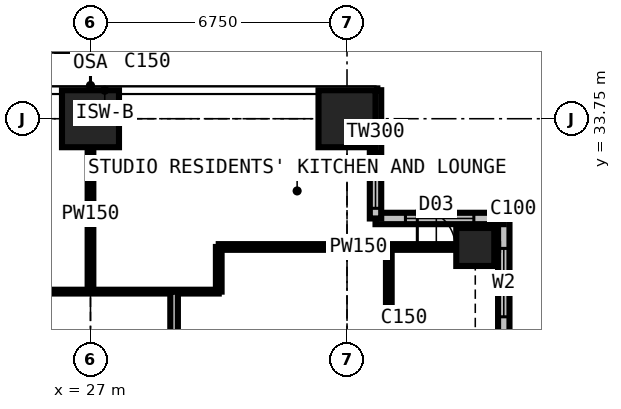
"""IFC4 building model, lengths in metres.
Left out: names, types, materials, properties, quantities, classifications, styles, units other than length and angle.
Written with IfcOpenShell. Run it as: python <this file> out.ifc"""

import sys

from ifc_helpers import new_model, si_unit, direction, frame, frame_2d, origin, origin_2d, place, context, subcontext, project, spatial, rectangle, extrude, element, fill, save


model = new_model("IFC4")
c1 = context("Model", 3, precision=1e-05, world=origin(), true_north=direction((0.0, 1.0)))
c2 = subcontext(c1, "Body", "Model", "MODEL_VIEW")
j1 = project(units=[si_unit("LENGTHUNIT", "METRE"), si_unit("PLANEANGLEUNIT", "RADIAN")], contexts=[c1])
p1 = place(None, origin())
s1 = spatial("IfcSite", under=j1, at=p1, CompositionType="ELEMENT")
p2 = place(p1, origin())
s2 = spatial("IfcBuilding", under=s1, at=p2, CompositionType="ELEMENT")
p3 = place(p2, frame((0.0, 0.0, 130.5)))
s3 = spatial("IfcBuildingStorey", under=s2, at=p3, CompositionType="ELEMENT", Elevation=130.5)
for number, where, z_axis, x_axis in (
    (1, (27.0, 33.75, 0.0), (0.0, 0.0, 1.0), (1.0, 0.0, 0.0)),
    (2, (33.75, 33.75, 0.0), (0.0, 0.0, 1.0), (1.0, 0.0, 0.0)),
):
    element("IfcColumn", number, at=place(p3, frame(where, z_axis=z_axis, x_axis=x_axis)), inside=s3, PredefinedType="COLUMN", context=c2, shape_type="SweptSolid", body=[
        extrude(rectangle(XDim=1.5, YDim=1.5, at=origin_2d()), origin(), (0.0, 0.0, 1.0), 3.6),
    ])
p4 = place(p3, frame((37.125, 30.375, 0.0), z_axis=(0.0, 0.0, 1.0), x_axis=(1.0, 0.0, 0.0)))
e3 = element("IfcColumn", 3, at=p4, inside=s3, PredefinedType="COLUMN", context=c2, shape_type="SweptSolid", body=[
    extrude(rectangle(XDim=1.0, YDim=1.0, at=origin_2d()), origin(), (0.0, 0.0, 1.0), 3.6),
])
p5 = place(p3, frame((37.875, 27.75, 0.0), z_axis=(0.0, 0.0, 1.0), x_axis=(0.0, 1.0, 0.0)))
e4 = element("IfcWall", 4, at=p5, inside=s3, PredefinedType="SOLIDWALL", context=c2, shape_type="SweptSolid", body=[
    extrude(rectangle(XDim=3.375, YDim=0.3, at=frame_2d((1.688, 0.0))), origin(), (0.0, 0.0, 1.0), 3.375),
])
p6 = place(p5, frame((0.788, 0.0, 0.6)))
e5 = element("IfcOpeningElement", 5, at=p6, cuts=e4, PredefinedType="OPENING", context=c2, shape_type="SweptSolid", body=[
    extrude(rectangle(XDim=1.8, YDim=2.1, at=frame_2d((0.9, 1.05))), frame((0.0, 0.16, 0.0), z_axis=(0.0, -1.0, 0.0), x_axis=(1.0, 0.0, 0.0)), (0.0, 0.0, 1.0), 0.32),
])
p7 = place(p3, frame((37.875, 31.125, 0.0), z_axis=(0.0, 0.0, 1.0), x_axis=(-1.0, 0.0, 0.0)))
e6 = element("IfcWall", 6, at=p7, inside=s3, PredefinedType="SOLIDWALL", context=c2, shape_type="SweptSolid", body=[
    extrude(rectangle(XDim=3.375, YDim=0.3, at=frame_2d((1.688, 0.0))), origin(), (0.0, 0.0, 1.0), 3.375),
])
p8 = place(p7, frame((0.788, 0.0, 0.6)))
e7 = element("IfcOpeningElement", 7, at=p8, cuts=e6, PredefinedType="OPENING", context=c2, shape_type="SweptSolid", body=[
    extrude(rectangle(XDim=1.8, YDim=2.1, at=frame_2d((0.9, 1.05))), frame((0.0, 0.16, 0.0), z_axis=(0.0, -1.0, 0.0), x_axis=(1.0, 0.0, 0.0)), (0.0, 0.0, 1.0), 0.32),
])
p9 = place(p3, frame((34.5, 31.125, 0.0), z_axis=(0.0, 0.0, 1.0), x_axis=(0.0, 1.0, 0.0)))
e8 = element("IfcWall", 8, at=p9, inside=s3, PredefinedType="SOLIDWALL", context=c2, shape_type="SweptSolid", body=[
    extrude(rectangle(XDim=3.375, YDim=0.3, at=frame_2d((1.688, 0.0))), origin(), (0.0, 0.0, 1.0), 3.375),
])
p10 = place(p9, frame((0.268, 0.0, 0.9)))
e9 = element("IfcOpeningElement", 9, at=p10, cuts=e8, PredefinedType="OPENING", context=c2, shape_type="SweptSolid", body=[
    extrude(rectangle(XDim=1.5, YDim=1.8, at=frame_2d((0.75, 0.9))), frame((0.0, 0.16, 0.0), z_axis=(0.0, -1.0, 0.0), x_axis=(1.0, 0.0, 0.0)), (0.0, 0.0, 1.0), 0.32),
])
p11 = place(p3, frame((11.3, 29.2, 0.0), z_axis=(0.0, 0.0, 1.0), x_axis=(1.0, 0.0, 0.0)))
e10 = element("IfcWall", 10, at=p11, inside=s3, PredefinedType="PARTITIONING", context=c2, shape_type="SweptSolid", body=[
    extrude(rectangle(XDim=19.075, YDim=0.1, at=frame_2d((9.538, 0.0))), origin(), (0.0, 0.0, 1.0), 3.375),
])
p12 = place(p11, frame((6.4, 0.0, 0.0)))
e11 = element("IfcOpeningElement", 11, at=p12, cuts=e10, PredefinedType="OPENING", context=c2, shape_type="SweptSolid", body=[
    extrude(rectangle(XDim=0.95, YDim=2.2, at=frame_2d((0.475, 1.1))), frame((0.0, 0.06, 0.0), z_axis=(0.0, -1.0, 0.0), x_axis=(1.0, 0.0, 0.0)), (0.0, 0.0, 1.0), 0.12),
])
p13 = place(p11, frame((13.15, 0.0, 0.0)))
e12 = element("IfcOpeningElement", 12, at=p13, cuts=e10, PredefinedType="OPENING", context=c2, shape_type="SweptSolid", body=[
    extrude(rectangle(XDim=0.95, YDim=2.2, at=frame_2d((0.475, 1.1))), frame((0.0, 0.06, 0.0), z_axis=(0.0, -1.0, 0.0), x_axis=(1.0, 0.0, 0.0)), (0.0, 0.0, 1.0), 0.12),
])
p14 = place(p11, frame((0.6, 0.0, 0.0)))
e13 = element("IfcOpeningElement", 13, at=p14, cuts=e10, PredefinedType="OPENING", context=c2, shape_type="SweptSolid", body=[
    extrude(rectangle(XDim=1.0, YDim=2.2, at=frame_2d((0.5, 1.1))), frame((0.0, 0.06, 0.0), z_axis=(0.0, -1.0, 0.0), x_axis=(1.0, 0.0, 0.0)), (0.0, 0.0, 1.0), 0.12),
])
p15 = place(p3, frame((27.0, 29.2, 0.0), z_axis=(0.0, 0.0, 1.0), x_axis=(0.0, 1.0, 0.0)))
e14 = element("IfcWall", 14, at=p15, inside=s3, PredefinedType="PARTITIONING", context=c2, shape_type="SweptSolid", body=[
    extrude(rectangle(XDim=5.284, YDim=0.15, at=frame_2d((2.642, 0.0))), origin(), (0.0, 0.0, 1.0), 2.61),
])
p16 = place(p3, frame((29.2, 11.3, 0.0), z_axis=(0.0, 0.0, 1.0), x_axis=(0.0, 1.0, 0.0)))
e15 = element("IfcWall", 15, at=p16, inside=s3, PredefinedType="PARTITIONING", context=c2, shape_type="SweptSolid", body=[
    extrude(rectangle(XDim=17.9, YDim=0.2, at=frame_2d((8.95, 0.0))), origin(), (0.0, 0.0, 1.0), 3.375),
])
p17 = place(p16, frame((8.35, 0.0, 0.0)))
e16 = element("IfcOpeningElement", 16, at=p17, cuts=e15, PredefinedType="OPENING", context=c2, shape_type="SweptSolid", body=[
    extrude(rectangle(XDim=1.2, YDim=2.2, at=frame_2d((0.6, 1.1))), frame((0.0, 0.11, 0.0), z_axis=(0.0, -1.0, 0.0), x_axis=(1.0, 0.0, 0.0)), (0.0, 0.0, 1.0), 0.22),
])
p18 = place(p3, frame((30.375, 29.2, 0.0), z_axis=(0.0, 0.0, 1.0), x_axis=(0.0, 1.0, 0.0)))
e17 = element("IfcWall", 17, at=p18, inside=s3, PredefinedType="PARTITIONING", context=c2, shape_type="SweptSolid", body=[
    extrude(rectangle(XDim=1.175, YDim=0.15, at=frame_2d((0.587, 0.0))), origin(), (0.0, 0.0, 1.0), 3.375),
])
p19 = place(p3, frame((30.375, 30.375, 0.0), z_axis=(0.0, 0.0, 1.0), x_axis=(1.0, 0.0, 0.0)))
e18 = element("IfcWall", 18, at=p19, inside=s3, PredefinedType="PARTITIONING", context=c2, shape_type="SweptSolid", body=[
    extrude(rectangle(XDim=7.35, YDim=0.15, at=frame_2d((3.675, 0.0))), origin(), (0.0, 0.0, 1.0), 2.877),
])
p20 = place(p19, frame((5.225, 0.0, 0.0)))
e19 = element("IfcOpeningElement", 19, at=p20, cuts=e18, PredefinedType="OPENING", context=c2, shape_type="SweptSolid", body=[
    extrude(rectangle(XDim=1.0, YDim=2.2, at=frame_2d((0.5, 1.1))), frame((0.0, 0.085, 0.0), z_axis=(0.0, -1.0, 0.0), x_axis=(1.0, 0.0, 0.0)), (0.0, 0.0, 1.0), 0.17),
])
p21 = place(p3, frame((34.85, 12.55, 0.0), z_axis=(0.0, 0.0, 1.0), x_axis=(0.0, 1.0, 0.0)))
e20 = element("IfcWall", 20, at=p21, inside=s3, PredefinedType="PARTITIONING", context=c2, shape_type="SweptSolid", body=[
    extrude(rectangle(XDim=17.825, YDim=0.15, at=frame_2d((8.913, 0.0))), origin(), (0.0, 0.0, 1.0), 3.375),
])
p22 = place(p21, frame((8.5, 0.0, 0.0)))
e21 = element("IfcOpeningElement", 21, at=p22, cuts=e20, PredefinedType="OPENING", context=c2, shape_type="SweptSolid", body=[
    extrude(rectangle(XDim=0.95, YDim=2.2, at=frame_2d((0.475, 1.1))), frame((0.0, 0.085, 0.0), z_axis=(0.0, -1.0, 0.0), x_axis=(1.0, 0.0, 0.0)), (0.0, 0.0, 1.0), 0.17),
])
p23 = place(p6, origin())
e22 = element("IfcWindow", 22, at=p23, inside=s3, PartitioningType="SINGLE_PANEL", PredefinedType="WINDOW", context=c2, shape_type="SweptSolid", body=[
    extrude(rectangle(XDim=1.8, YDim=2.1, at=frame_2d((0.9, 1.05))), frame((0.0, 0.03, 0.0), z_axis=(0.0, -1.0, 0.0), x_axis=(1.0, 0.0, 0.0)), (0.0, 0.0, 1.0), 0.06),
])
fill(e5, e22)
p24 = place(p8, origin())
e23 = element("IfcWindow", 23, at=p24, inside=s3, PartitioningType="SINGLE_PANEL", PredefinedType="WINDOW", context=c2, shape_type="SweptSolid", body=[
    extrude(rectangle(XDim=1.8, YDim=2.1, at=frame_2d((0.9, 1.05))), frame((0.0, 0.03, 0.0), z_axis=(0.0, -1.0, 0.0), x_axis=(1.0, 0.0, 0.0)), (0.0, 0.0, 1.0), 0.06),
])
fill(e7, e23)
p25 = place(p10, origin())
e24 = element("IfcWindow", 24, at=p25, inside=s3, PartitioningType="SINGLE_PANEL", PredefinedType="WINDOW", context=c2, shape_type="SweptSolid", body=[
    extrude(rectangle(XDim=1.5, YDim=1.8, at=frame_2d((0.75, 0.9))), frame((0.0, 0.03, 0.0), z_axis=(0.0, -1.0, 0.0), x_axis=(1.0, 0.0, 0.0)), (0.0, 0.0, 1.0), 0.06),
])
fill(e9, e24)
p26 = place(p20, origin())
e25 = element("IfcDoor", 25, at=p26, inside=s3, OperationType="SINGLE_SWING_LEFT", PredefinedType="DOOR", context=c2, shape_type="SweptSolid", body=[
    extrude(rectangle(XDim=1.0, YDim=2.2, at=frame_2d((0.5, 1.1))), frame((0.0, 0.025, 0.0), z_axis=(0.0, -1.0, 0.0), x_axis=(1.0, 0.0, 0.0)), (0.0, 0.0, 1.0), 0.05),
])
fill(e19, e25)
save(model, sys.argv[1])
